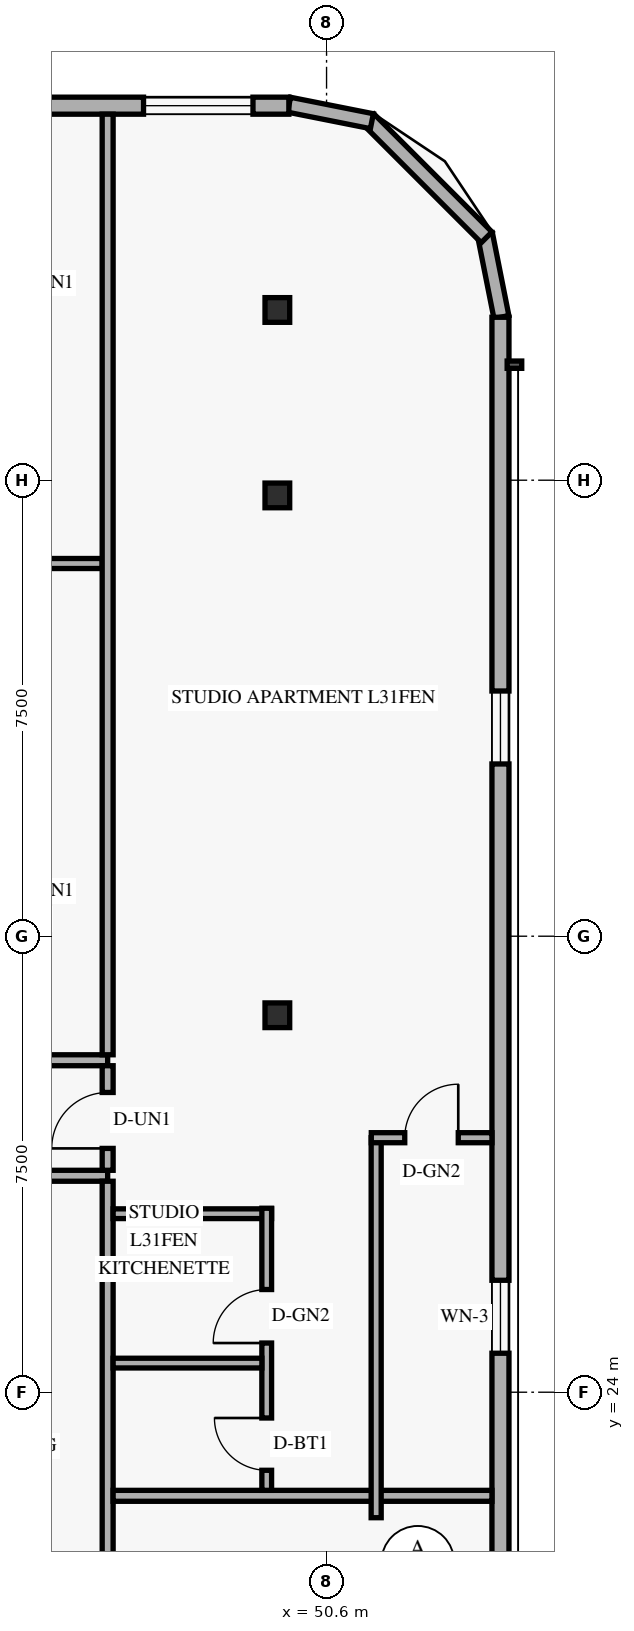
"""IFC4 building model, lengths in metres.
Left out: names, types, materials, properties, quantities, classifications, styles, units other than length and angle.
Written with IfcOpenShell. Run it as: python <this file> out.ifc"""

import sys

from ifc_helpers import new_model, si_unit, direction, frame, frame_2d, origin, origin_2d, place, context, subcontext, project, spatial, rectangle, hollow_rectangle, extrude, element, fill, save


model = new_model("IFC4")
c1 = context("Model", 3, precision=1e-05, world=origin(), true_north=direction((0.0, 1.0)))
c2 = subcontext(c1, "Body", "Model", "MODEL_VIEW")
j1 = project(units=[si_unit("LENGTHUNIT", "METRE"), si_unit("PLANEANGLEUNIT", "RADIAN")], contexts=[c1])
p1 = place(None, origin())
s1 = spatial("IfcSite", under=j1, at=p1, CompositionType="ELEMENT")
p2 = place(p1, origin())
s2 = spatial("IfcBuilding", under=s1, at=p2, CompositionType="ELEMENT")
p3 = place(p2, frame((0.0, 0.0, 121.2)))
s3 = spatial("IfcBuildingStorey", under=s2, at=p3, CompositionType="ELEMENT", Elevation=121.2)
for number, where, z_axis, x_axis in (
    (1, (49.686, 30.2, 0.0), (0.058, 0.0, 0.998), (0.0, 1.0, 0.0)),
    (2, (49.686, 38.75, 0.0), (0.058, 0.0, 0.998), (0.0, 1.0, 0.0)),
    (3, (49.686, 41.8, 0.0), (0.058, 0.0, 0.998), (0.0, 1.0, 0.0)),
):
    element("IfcColumn", number, at=place(p3, frame(where, z_axis=z_axis, x_axis=x_axis)), inside=s3, PredefinedType="COLUMN", context=c2, shape_type="SweptSolid", body=[
        extrude(hollow_rectangle(XDim=0.406, YDim=0.406, WallThickness=0.016, at=origin_2d()), origin(), (0.0, 0.0, 1.0), 3.606),
    ])
p4 = place(p3, frame((53.476, 41.684, 0.0), z_axis=(0.0, 0.0, 1.0), x_axis=(-0.195000137217, 0.980803214965, 0.0)))
e4 = element("IfcWall", 4, at=p4, inside=s3, PredefinedType="SOLIDWALL", context=c2, shape_type="SweptSolid", body=[
    extrude(rectangle(XDim=1.388, YDim=0.25, at=frame_2d((0.694, 0.0))), origin(), (0.0, 0.0, 1.0), 3.36),
])
p5 = place(p3, frame((53.232, 42.995, 0.0), z_axis=(0.0, 0.0, 1.0), x_axis=(-0.707151344399, 0.707062215165, 0.0)))
e5 = element("IfcWall", 5, at=p5, inside=s3, PredefinedType="SOLIDWALL", context=c2, shape_type="SweptSolid", body=[
    extrude(rectangle(XDim=2.739, YDim=0.25, at=frame_2d((1.37, 0.0))), origin(), (0.0, 0.0, 1.0), 3.36),
])
p6 = place(p3, frame((51.345, 44.905, 0.0), z_axis=(0.0, 0.0, 1.0), x_axis=(-0.980809899341, 0.19496651342, 0.0)))
e6 = element("IfcWall", 6, at=p6, inside=s3, PredefinedType="SOLIDWALL", context=c2, shape_type="SweptSolid", body=[
    extrude(rectangle(XDim=1.389, YDim=0.25, at=frame_2d((0.694, 0.0))), origin(), (0.0, 0.0, 1.0), 3.36),
])
p7 = place(p3, frame((53.46, 6.32, 0.0), z_axis=(0.0, 0.0, 1.0), x_axis=(0.0, 1.0, 0.0)))
e7 = element("IfcWall", 7, at=p7, inside=s3, PredefinedType="SOLIDWALL", context=c2, shape_type="SweptSolid", body=[
    extrude(rectangle(XDim=35.36, YDim=0.28, at=frame_2d((17.68, 0.0))), origin(), (0.0, 0.0, 1.0), 3.36),
])
p8 = place(p7, frame((7.388, 0.0, 0.85)))
e8 = element("IfcOpeningElement", 8, at=p8, cuts=e7, PredefinedType="OPENING", context=c2, shape_type="SweptSolid", body=[
    extrude(rectangle(XDim=1.2, YDim=1.5, at=frame_2d((0.6, 0.75))), frame((0.0, 0.15, 0.0), z_axis=(0.0, -1.0, 0.0), x_axis=(1.0, 0.0, 0.0)), (0.0, 0.0, 1.0), 0.3),
])
p9 = place(p7, frame((18.321, 0.0, 0.85)))
e9 = element("IfcOpeningElement", 9, at=p9, cuts=e7, PredefinedType="OPENING", context=c2, shape_type="SweptSolid", body=[
    extrude(rectangle(XDim=1.2, YDim=1.5, at=frame_2d((0.6, 0.75))), frame((0.0, 0.15, 0.0), z_axis=(0.0, -1.0, 0.0), x_axis=(1.0, 0.0, 0.0)), (0.0, 0.0, 1.0), 0.3),
])
p10 = place(p7, frame((28.013, 0.0, 0.85)))
e10 = element("IfcOpeningElement", 10, at=p10, cuts=e7, PredefinedType="OPENING", context=c2, shape_type="SweptSolid", body=[
    extrude(rectangle(XDim=1.2, YDim=1.5, at=frame_2d((0.6, 0.75))), frame((0.0, 0.15, 0.0), z_axis=(0.0, -1.0, 0.0), x_axis=(1.0, 0.0, 0.0)), (0.0, 0.0, 1.0), 0.3),
])
p11 = place(p3, frame((49.98, 45.16, 0.0), z_axis=(0.0, 0.0, 1.0), x_axis=(-1.0, 0.0, 0.0)))
e11 = element("IfcWall", 11, at=p11, inside=s3, PredefinedType="SOLIDWALL", context=c2, shape_type="SweptSolid", body=[
    extrude(rectangle(XDim=36.56, YDim=0.28, at=frame_2d((18.28, 0.0))), origin(), (0.0, 0.0, 1.0), 3.36),
])
p12 = place(p11, frame((31.545, 0.0, 0.85)))
e12 = element("IfcOpeningElement", 12, at=p12, cuts=e11, PredefinedType="OPENING", context=c2, shape_type="SweptSolid", body=[
    extrude(rectangle(XDim=1.8, YDim=1.6, at=frame_2d((0.9, 0.8))), frame((0.0, 0.15, 0.0), z_axis=(0.0, -1.0, 0.0), x_axis=(1.0, 0.0, 0.0)), (0.0, 0.0, 1.0), 0.3),
])
p13 = place(p11, frame((23.48, 0.0, 0.85)))
e13 = element("IfcOpeningElement", 13, at=p13, cuts=e11, PredefinedType="OPENING", context=c2, shape_type="SweptSolid", body=[
    extrude(rectangle(XDim=1.8, YDim=1.6, at=frame_2d((0.9, 0.8))), frame((0.0, 0.15, 0.0), z_axis=(0.0, -1.0, 0.0), x_axis=(1.0, 0.0, 0.0)), (0.0, 0.0, 1.0), 0.3),
])
p14 = place(p11, frame((16.595, 0.0, 0.85)))
e14 = element("IfcOpeningElement", 14, at=p14, cuts=e11, PredefinedType="OPENING", context=c2, shape_type="SweptSolid", body=[
    extrude(rectangle(XDim=1.8, YDim=1.6, at=frame_2d((0.9, 0.8))), frame((0.0, 0.15, 0.0), z_axis=(0.0, -1.0, 0.0), x_axis=(1.0, 0.0, 0.0)), (0.0, 0.0, 1.0), 0.3),
])
p15 = place(p11, frame((10.365, 0.0, 0.85)))
e15 = element("IfcOpeningElement", 15, at=p15, cuts=e11, PredefinedType="OPENING", context=c2, shape_type="SweptSolid", body=[
    extrude(rectangle(XDim=1.8, YDim=1.6, at=frame_2d((0.9, 0.8))), frame((0.0, 0.15, 0.0), z_axis=(0.0, -1.0, 0.0), x_axis=(1.0, 0.0, 0.0)), (0.0, 0.0, 1.0), 0.3),
])
p16 = place(p11, frame((4.575, 0.0, 0.85)))
e16 = element("IfcOpeningElement", 16, at=p16, cuts=e11, PredefinedType="OPENING", context=c2, shape_type="SweptSolid", body=[
    extrude(rectangle(XDim=1.8, YDim=1.6, at=frame_2d((0.9, 0.8))), frame((0.0, 0.15, 0.0), z_axis=(0.0, -1.0, 0.0), x_axis=(1.0, 0.0, 0.0)), (0.0, 0.0, 1.0), 0.3),
])
p17 = place(p11, frame((0.59, 0.0, 0.85)))
e17 = element("IfcOpeningElement", 17, at=p17, cuts=e11, PredefinedType="OPENING", context=c2, shape_type="SweptSolid", body=[
    extrude(rectangle(XDim=1.8, YDim=1.6, at=frame_2d((0.9, 0.8))), frame((0.0, 0.15, 0.0), z_axis=(0.0, -1.0, 0.0), x_axis=(1.0, 0.0, 0.0)), (0.0, 0.0, 1.0), 0.3),
])
p18 = place(p3, frame((37.64, 27.56, 0.0), z_axis=(0.0, 0.0, 1.0), x_axis=(1.0, 0.0, 0.0)))
e18 = element("IfcWall", 18, at=p18, inside=s3, PredefinedType="STANDARD", context=c2, shape_type="SweptSolid", body=[
    extrude(rectangle(XDim=9.36, YDim=0.18, at=frame_2d((4.68, 0.0))), origin(), (0.0, 0.0, 1.0), 2.731),
])
p19 = place(p3, frame((35.51, 29.46, 0.0), z_axis=(0.0, 0.0, 1.0), x_axis=(1.0, 0.0, 0.0)))
e19 = element("IfcWall", 19, at=p19, inside=s3, PredefinedType="STANDARD", context=c2, shape_type="SweptSolid", body=[
    extrude(rectangle(XDim=11.49, YDim=0.18, at=frame_2d((5.745, 0.0))), origin(), (0.0, 0.0, 1.0), 2.731),
])
p20 = place(p19, frame((0.32, 0.0, 0.0)))
e20 = element("IfcOpeningElement", 20, at=p20, cuts=e19, PredefinedType="OPENING", context=c2, shape_type="SweptSolid", body=[
    extrude(rectangle(XDim=0.92, YDim=2.15, at=frame_2d((0.46, 1.075))), frame((0.0, 0.1, 0.0), z_axis=(0.0, -1.0, 0.0), x_axis=(1.0, 0.0, 0.0)), (0.0, 0.0, 1.0), 0.2),
])
p21 = place(p3, frame((42.09, 37.63, 0.0), z_axis=(0.0, 0.0, 1.0), x_axis=(1.0, 0.0, 0.0)))
e21 = element("IfcWall", 21, at=p21, inside=s3, PredefinedType="PARTITIONING", context=c2, shape_type="SweptSolid", body=[
    extrude(rectangle(XDim=4.82, YDim=0.165, at=frame_2d((2.41, 0.0))), origin(), (0.0, 0.0, 1.0), 2.731),
])
p22 = place(p3, frame((47.0, 27.65, 0.0), z_axis=(0.0, 0.0, 1.0), x_axis=(0.0, 1.0, 0.0)))
e22 = element("IfcWall", 22, at=p22, inside=s3, PredefinedType="STANDARD", context=c2, shape_type="SweptSolid", body=[
    extrude(rectangle(XDim=1.72, YDim=0.18, at=frame_2d((0.86, 0.0))), origin(), (0.0, 0.0, 1.0), 3.36),
])
p23 = place(p22, frame((0.36, 0.0, 0.0)))
e23 = element("IfcOpeningElement", 23, at=p23, cuts=e22, PredefinedType="OPENING", context=c2, shape_type="SweptSolid", body=[
    extrude(rectangle(XDim=0.92, YDim=2.15, at=frame_2d((0.46, 1.075))), frame((0.0, 0.1, 0.0), z_axis=(0.0, -1.0, 0.0), x_axis=(1.0, 0.0, 0.0)), (0.0, 0.0, 1.0), 0.2),
])
p24 = place(p3, frame((47.0, 17.37, 0.0), z_axis=(0.0, 0.0, 1.0), x_axis=(0.0, 1.0, 0.0)))
e24 = element("IfcWall", 24, at=p24, inside=s3, PredefinedType="PARTITIONING", context=c2, shape_type="SweptSolid", body=[
    extrude(rectangle(XDim=10.1, YDim=0.18, at=frame_2d((5.05, 0.0))), origin(), (0.0, 0.0, 1.0), 2.731),
])
p25 = place(p3, frame((47.0, 29.55, 0.0), z_axis=(0.0, 0.0, 1.0), x_axis=(0.0, 1.0, 0.0)))
e25 = element("IfcWall", 25, at=p25, inside=s3, PredefinedType="PARTITIONING", context=c2, shape_type="SweptSolid", body=[
    extrude(rectangle(XDim=15.47, YDim=0.18, at=frame_2d((7.735, 0.0))), origin(), (0.0, 0.0, 1.0), 2.731),
])
p26 = place(p3, frame((47.09, 22.296, 0.0), z_axis=(0.0, 0.0, 1.0), x_axis=(1.0, 0.0, 0.0)))
e26 = element("IfcWall", 26, at=p26, inside=s3, PredefinedType="PARTITIONING", context=c2, shape_type="SweptSolid", body=[
    extrude(rectangle(XDim=6.23, YDim=0.18, at=frame_2d((3.115, 0.0))), origin(), (0.0, 0.0, 1.0), 2.809),
])
p27 = place(p3, frame((47.09, 26.936, 0.0), z_axis=(0.0, 0.0, 1.0), x_axis=(1.0, 0.0, 0.0)))
e27 = element("IfcWall", 27, at=p27, inside=s3, PredefinedType="PLUMBINGWALL", context=c2, shape_type="SweptSolid", body=[
    extrude(rectangle(XDim=2.606, YDim=0.16, at=frame_2d((1.303, 0.0))), origin(), (0.0, 0.0, 1.0), 3.36),
])
p28 = place(p3, frame((49.616, 22.386, 0.0), z_axis=(0.0, 0.0, 1.0), x_axis=(0.0, 1.0, 0.0)))
e28 = element("IfcWall", 28, at=p28, inside=s3, PredefinedType="PLUMBINGWALL", context=c2, shape_type="SweptSolid", body=[
    extrude(rectangle(XDim=4.64, YDim=0.16, at=frame_2d((2.32, 0.0))), origin(), (0.0, 0.0, 1.0), 3.36),
])
p29 = place(p28, frame((0.33, 0.0, 0.0)))
e29 = element("IfcOpeningElement", 29, at=p29, cuts=e28, PredefinedType="OPENING", context=c2, shape_type="SweptSolid", body=[
    extrude(rectangle(XDim=0.86, YDim=2.12, at=frame_2d((0.43, 1.06))), frame((0.0, 0.09, 0.0), z_axis=(0.0, -1.0, 0.0), x_axis=(1.0, 0.0, 0.0)), (0.0, 0.0, 1.0), 0.18),
])
p30 = place(p28, frame((2.423, 0.0, 0.0)))
e30 = element("IfcOpeningElement", 30, at=p30, cuts=e28, PredefinedType="OPENING", context=c2, shape_type="SweptSolid", body=[
    extrude(rectangle(XDim=0.88, YDim=2.12, at=frame_2d((0.44, 1.06))), frame((0.0, 0.09, 0.0), z_axis=(0.0, -1.0, 0.0), x_axis=(1.0, 0.0, 0.0)), (0.0, 0.0, 1.0), 0.18),
])
p31 = place(p3, frame((47.09, 24.479, 0.0), z_axis=(0.0, 0.0, 1.0), x_axis=(1.0, 0.0, 0.0)))
e31 = element("IfcWall", 31, at=p31, inside=s3, PredefinedType="PLUMBINGWALL", context=c2, shape_type="SweptSolid", body=[
    extrude(rectangle(XDim=2.446, YDim=0.16, at=frame_2d((1.223, 0.0))), origin(), (0.0, 0.0, 1.0), 3.36),
])
p32 = place(p3, frame((51.416, 21.936, 0.0), z_axis=(0.0, 0.0, 1.0), x_axis=(0.0, 1.0, 0.0)))
e32 = element("IfcWall", 32, at=p32, inside=s3, PredefinedType="PARTITIONING", context=c2, shape_type="SweptSolid", body=[
    extrude(rectangle(XDim=6.25, YDim=0.165, at=frame_2d((3.125, 0.0))), origin(), (0.0, 0.0, 1.0), 3.36),
])
p33 = place(p3, frame((51.336, 28.186, 0.0), z_axis=(0.0, 0.0, 1.0), x_axis=(1.0, 0.0, 0.0)))
e33 = element("IfcWall", 33, at=p33, inside=s3, PredefinedType="PARTITIONING", context=c2, shape_type="SweptSolid", body=[
    extrude(rectangle(XDim=1.984, YDim=0.165, at=frame_2d((0.992, 0.0))), origin(), (0.0, 0.0, 1.0), 3.36),
])
p34 = place(p33, frame((0.55, 0.0, 0.0)))
e34 = element("IfcOpeningElement", 34, at=p34, cuts=e33, PredefinedType="OPENING", context=c2, shape_type="SweptSolid", body=[
    extrude(rectangle(XDim=0.88, YDim=2.12, at=frame_2d((0.44, 1.06))), frame((0.0, 0.093, 0.0), z_axis=(0.0, -1.0, 0.0), x_axis=(1.0, 0.0, 0.0)), (0.0, 0.0, 1.0), 0.185),
])
p35 = place(p9, origin())
e35 = element("IfcWindow", 35, at=p35, inside=s3, PartitioningType="SINGLE_PANEL", PredefinedType="WINDOW", context=c2, shape_type="SweptSolid", body=[
    extrude(rectangle(XDim=1.2, YDim=1.5, at=frame_2d((0.6, 0.75))), frame((0.0, 0.03, 0.0), z_axis=(0.0, -1.0, 0.0), x_axis=(1.0, 0.0, 0.0)), (0.0, 0.0, 1.0), 0.06),
])
fill(e9, e35)
p36 = place(p10, origin())
e36 = element("IfcWindow", 36, at=p36, inside=s3, PartitioningType="SINGLE_PANEL", PredefinedType="WINDOW", context=c2, shape_type="SweptSolid", body=[
    extrude(rectangle(XDim=1.2, YDim=1.5, at=frame_2d((0.6, 0.75))), frame((0.0, 0.03, 0.0), z_axis=(0.0, -1.0, 0.0), x_axis=(1.0, 0.0, 0.0)), (0.0, 0.0, 1.0), 0.06),
])
fill(e10, e36)
p37 = place(p17, origin())
e37 = element("IfcWindow", 37, at=p37, inside=s3, PartitioningType="SINGLE_PANEL", PredefinedType="WINDOW", context=c2, shape_type="SweptSolid", body=[
    extrude(rectangle(XDim=1.8, YDim=1.6, at=frame_2d((0.9, 0.8))), frame((0.0, 0.03, 0.0), z_axis=(0.0, -1.0, 0.0), x_axis=(1.0, 0.0, 0.0)), (0.0, 0.0, 1.0), 0.06),
])
fill(e17, e37)
p38 = place(p34, origin())
e38 = element("IfcDoor", 38, at=p38, inside=s3, OperationType="SINGLE_SWING_RIGHT", PredefinedType="DOOR", context=c2, shape_type="SweptSolid", body=[
    extrude(rectangle(XDim=0.88, YDim=2.12, at=frame_2d((0.44, 1.06))), frame((0.0, 0.025, 0.0), z_axis=(0.0, -1.0, 0.0), x_axis=(1.0, 0.0, 0.0)), (0.0, 0.0, 1.0), 0.05),
])
fill(e34, e38)
p39 = place(p23, origin())
e39 = element("IfcDoor", 39, at=p39, inside=s3, OperationType="SINGLE_SWING_LEFT", PredefinedType="DOOR", context=c2, shape_type="SweptSolid", body=[
    extrude(rectangle(XDim=0.92, YDim=2.15, at=frame_2d((0.46, 1.075))), frame((0.0, 0.025, 0.0), z_axis=(0.0, -1.0, 0.0), x_axis=(1.0, 0.0, 0.0)), (0.0, 0.0, 1.0), 0.05),
])
fill(e23, e39)
p40 = place(p29, origin())
e40 = element("IfcDoor", 40, at=p40, inside=s3, OperationType="SINGLE_SWING_RIGHT", PredefinedType="DOOR", context=c2, shape_type="SweptSolid", body=[
    extrude(rectangle(XDim=0.86, YDim=2.12, at=frame_2d((0.43, 1.06))), frame((0.0, 0.025, 0.0), z_axis=(0.0, -1.0, 0.0), x_axis=(1.0, 0.0, 0.0)), (0.0, 0.0, 1.0), 0.05),
])
fill(e29, e40)
p41 = place(p30, origin())
e41 = element("IfcDoor", 41, at=p41, inside=s3, OperationType="SINGLE_SWING_LEFT", PredefinedType="DOOR", context=c2, shape_type="SweptSolid", body=[
    extrude(rectangle(XDim=0.88, YDim=2.12, at=frame_2d((0.44, 1.06))), frame((0.0, 0.025, 0.0), z_axis=(0.0, -1.0, 0.0), x_axis=(1.0, 0.0, 0.0)), (0.0, 0.0, 1.0), 0.05),
])
fill(e30, e41)
save(model, sys.argv[1])
